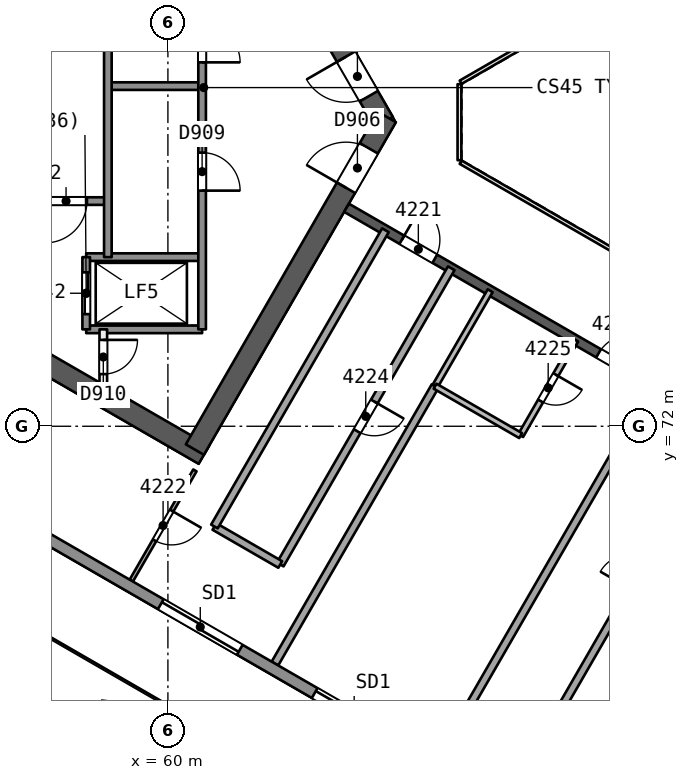
"""IFC4 building model, lengths in metres.
Left out: names, types, materials, properties, quantities, classifications, styles, units other than length and angle.
Written with IfcOpenShell. Run it as: python <this file> out.ifc"""

import sys

from ifc_helpers import new_model, si_unit, direction, frame, frame_2d, origin, place, context, subcontext, project, spatial, rectangle, extrude, element, fill, save


model = new_model("IFC4")
c1 = context("Model", 3, precision=1e-05, world=origin(), true_north=direction((0.0, 1.0)))
c2 = subcontext(c1, "Body", "Model", "MODEL_VIEW")
j1 = project(units=[si_unit("LENGTHUNIT", "METRE"), si_unit("PLANEANGLEUNIT", "RADIAN")], contexts=[c1])
p1 = place(None, origin())
s1 = spatial("IfcSite", under=j1, at=p1, CompositionType="ELEMENT")
p2 = place(p1, origin())
s2 = spatial("IfcBuilding", under=s1, at=p2, CompositionType="ELEMENT")
p3 = place(p2, frame((0.0, 0.0, 174.8)))
s3 = spatial("IfcBuildingStorey", under=s2, at=p3, CompositionType="ELEMENT", Elevation=174.8)
p4 = place(p3, frame((65.682, 80.0, 0.0), z_axis=(0.0, 0.0, 1.0), x_axis=(-0.500000202252, 0.866025287014, 0.0)))
e1 = element("IfcWall", 1, at=p4, inside=s3, PredefinedType="SHEAR", context=c2, shape_type="SweptSolid", body=[
    extrude(rectangle(XDim=10.221, YDim=0.55, at=frame_2d((5.111, 0.0))), origin(), (0.0, 0.0, 1.0), 3.7),
])
p5 = place(p4, frame((0.791, 0.0, 0.0)))
e2 = element("IfcOpeningElement", 2, at=p5, cuts=e1, PredefinedType="OPENING", context=c2, shape_type="SweptSolid", body=[
    extrude(rectangle(XDim=1.2, YDim=2.1, at=frame_2d((0.6, 1.05))), frame((0.0, 0.286, 0.0), z_axis=(0.0, -1.0, 0.0), x_axis=(1.0, 0.0, 0.0)), (0.0, 0.0, 1.0), 0.571),
])
p6 = place(p3, frame((60.709, 88.614, 0.0), z_axis=(0.0, 0.0, 1.0), x_axis=(-0.866020164116, -0.500009075263, 0.0)))
e3 = element("IfcWall", 3, at=p6, inside=s3, PredefinedType="SHEAR", context=c2, shape_type="SweptSolid", body=[
    extrude(rectangle(XDim=14.058, YDim=0.55, at=frame_2d((7.029, 0.0))), origin(), (0.0, 0.0, 1.0), 3.7),
])
p7 = place(p3, frame((48.672, 78.336, 0.0), z_axis=(0.0, 0.0, 1.0), x_axis=(0.866023530946, -0.500003243837, 0.0)))
e4 = element("IfcWall", 4, at=p7, inside=s3, PredefinedType="SHEAR", context=c2, shape_type="SweptSolid", body=[
    extrude(rectangle(XDim=14.175, YDim=0.55, at=frame_2d((7.087, 0.0))), origin(), (0.0, 0.0, 1.0), 3.7),
])
p8 = place(p3, frame((60.709, 71.386, 0.0), z_axis=(0.0, 0.0, 1.0), x_axis=(0.500015938302, 0.866016201606, 0.0)))
e5 = element("IfcWall", 5, at=p8, inside=s3, PredefinedType="SHEAR", context=c2, shape_type="SweptSolid", body=[
    extrude(rectangle(XDim=10.105, YDim=0.55, at=frame_2d((5.053, 0.0))), origin(), (0.0, 0.0, 1.0), 3.7),
])
p9 = place(p8, frame((7.955, 0.0, 0.0)))
e6 = element("IfcOpeningElement", 6, at=p9, cuts=e5, PredefinedType="OPENING", context=c2, shape_type="SweptSolid", body=[
    extrude(rectangle(XDim=1.2, YDim=2.1, at=frame_2d((0.6, 1.05))), frame((0.0, 0.286, 0.0), z_axis=(0.0, -1.0, 0.0), x_axis=(1.0, 0.0, 0.0)), (0.0, 0.0, 1.0), 0.571),
])
p10 = place(p3, frame((64.7, 77.748, 0.0), z_axis=(0.0, 0.0, 1.0), x_axis=(0.866026492143, -0.499998114903, 0.0)))
e7 = element("IfcWall", 7, at=p10, inside=s3, PredefinedType="SHEAR", context=c2, shape_type="SweptSolid", body=[
    extrude(rectangle(XDim=15.588, YDim=0.25, at=frame_2d((7.794, 0.0))), origin(), (0.0, 0.0, 1.0), 3.25),
])
p11 = place(p10, frame((1.682, 0.0, 0.0)))
e8 = element("IfcOpeningElement", 8, at=p11, cuts=e7, PredefinedType="OPENING", context=c2, shape_type="SweptSolid", body=[
    extrude(rectangle(XDim=1.0, YDim=2.1, at=frame_2d((0.5, 1.05))), frame((0.0, 0.135, 0.0), z_axis=(0.0, -1.0, 0.0), x_axis=(1.0, 0.0, 0.0)), (0.0, 0.0, 1.0), 0.271),
])
p12 = place(p10, frame((7.659, 0.0, 0.0)))
e9 = element("IfcOpeningElement", 9, at=p12, cuts=e7, PredefinedType="OPENING", context=c2, shape_type="SweptSolid", body=[
    extrude(rectangle(XDim=1.0, YDim=2.1, at=frame_2d((0.5, 1.05))), frame((0.0, 0.135, 0.0), z_axis=(0.0, -1.0, 0.0), x_axis=(1.0, 0.0, 0.0)), (0.0, 0.0, 1.0), 0.271),
])
p13 = place(p10, frame((11.971, 0.0, 0.0)))
e10 = element("IfcOpeningElement", 10, at=p13, cuts=e7, PredefinedType="OPENING", context=c2, shape_type="SweptSolid", body=[
    extrude(rectangle(XDim=1.0, YDim=2.1, at=frame_2d((0.5, 1.05))), frame((0.0, 0.135, 0.0), z_axis=(0.0, -1.0, 0.0), x_axis=(1.0, 0.0, 0.0)), (0.0, 0.0, 1.0), 0.271),
])
p14 = place(p3, frame((60.71, 70.838, 0.0), z_axis=(0.0, 0.0, 1.0), x_axis=(-0.499981198768, -0.866036258409, 0.0)))
e11 = element("IfcWall", 11, at=p14, inside=s3, PredefinedType="PARTITIONING", context=c2, shape_type="SweptSolid", body=[
    extrude(rectangle(XDim=3.349, YDim=0.1, at=frame_2d((1.674, 0.0))), origin(), (0.0, 0.0, 1.0), 3.25),
])
p15 = place(p14, frame((1.224, 0.0, 0.0)))
e12 = element("IfcOpeningElement", 12, at=p15, cuts=e11, PredefinedType="OPENING", context=c2, shape_type="SweptSolid", body=[
    extrude(rectangle(XDim=0.9, YDim=2.1, at=frame_2d((0.45, 1.05))), frame((0.0, 0.061, 0.0), z_axis=(0.0, -1.0, 0.0), x_axis=(1.0, 0.0, 0.0)), (0.0, 0.0, 1.0), 0.121),
])
p16 = place(p3, frame((67.456, 76.157, 0.0), z_axis=(0.0, 0.0, 1.0), x_axis=(-0.499990139034, -0.866031096941, 0.0)))
e13 = element("IfcWall", 13, at=p16, inside=s3, PredefinedType="PARTITIONING", context=c2, shape_type="SweptSolid", body=[
    extrude(rectangle(XDim=9.0, YDim=0.2, at=frame_2d((4.5, 0.0))), origin(), (0.0, 0.0, 1.0), 3.25),
])
p17 = place(p16, frame((4.05, 0.0, 0.0)))
e14 = element("IfcOpeningElement", 14, at=p17, cuts=e13, PredefinedType="OPENING", context=c2, shape_type="SweptSolid", body=[
    extrude(rectangle(XDim=0.9, YDim=2.1, at=frame_2d((0.45, 1.05))), frame((0.0, 0.11, 0.0), z_axis=(0.0, -1.0, 0.0), x_axis=(1.0, 0.0, 0.0)), (0.0, 0.0, 1.0), 0.221),
])
p18 = place(p3, frame((62.956, 68.363, 0.0), z_axis=(0.0, 0.0, 1.0), x_axis=(-0.866041268327, 0.499972520799, 0.0)))
e15 = element("IfcWall", 15, at=p18, inside=s3, PredefinedType="PARTITIONING", context=c2, shape_type="SweptSolid", body=[
    extrude(rectangle(XDim=2.0, YDim=0.2, at=frame_2d((1.0, 0.0))), origin(), (0.0, 0.0, 1.0), 3.25),
])
p19 = place(p3, frame((61.224, 69.363, 0.0), z_axis=(0.0, 0.0, 1.0), x_axis=(0.499990139034, 0.866031096941, 0.0)))
e16 = element("IfcWall", 16, at=p19, inside=s3, PredefinedType="PARTITIONING", context=c2, shape_type="SweptSolid", body=[
    extrude(rectangle(XDim=9.0, YDim=0.2, at=frame_2d((4.5, 0.0))), origin(), (0.0, 0.0, 1.0), 3.25),
])
p20 = place(p3, frame((62.816, 65.756, 0.0), z_axis=(0.0, 0.0, 1.0), x_axis=(0.500002470373, 0.866023977509, 0.0)))
e17 = element("IfcWall", 17, at=p20, inside=s3, PredefinedType="PARTITIONING", context=c2, shape_type="SweptSolid", body=[
    extrude(rectangle(XDim=8.428, YDim=0.2, at=frame_2d((4.214, 0.0))), origin(), (0.0, 0.0, 1.0), 3.25),
])
p21 = place(p3, frame((67.03, 73.054, 0.0), z_axis=(0.0, 0.0, 1.0), x_axis=(0.499987231761, 0.866032775405, 0.0)))
e18 = element("IfcWall", 18, at=p21, inside=s3, PredefinedType="PARTITIONING", context=c2, shape_type="SweptSolid", body=[
    extrude(rectangle(XDim=2.9, YDim=0.15, at=frame_2d((1.45, 0.0))), origin(), (0.0, 0.0, 1.0), 3.25),
])
p22 = place(p3, frame((70.732, 74.266, 0.0), z_axis=(0.0, 0.0, 1.0), x_axis=(-0.499987231761, -0.866032775405, 0.0)))
e19 = element("IfcWall", 19, at=p22, inside=s3, PredefinedType="PARTITIONING", context=c2, shape_type="SweptSolid", body=[
    extrude(rectangle(XDim=2.9, YDim=0.15, at=frame_2d((1.45, 0.0))), origin(), (0.0, 0.0, 1.0), 3.25),
])
p23 = place(p22, frame((1.05, 0.0, 0.0)))
e20 = element("IfcOpeningElement", 20, at=p23, cuts=e19, PredefinedType="OPENING", context=c2, shape_type="SweptSolid", body=[
    extrude(rectangle(XDim=0.8, YDim=2.1, at=frame_2d((0.4, 1.05))), frame((0.0, 0.085, 0.0), z_axis=(0.0, -1.0, 0.0), x_axis=(1.0, 0.0, 0.0)), (0.0, 0.0, 1.0), 0.171),
])
p24 = place(p3, frame((69.282, 71.754, 0.0), z_axis=(0.0, 0.0, 1.0), x_axis=(-0.866021400173, 0.500006934395, 0.0)))
e21 = element("IfcWall", 21, at=p24, inside=s3, PredefinedType="PARTITIONING", context=c2, shape_type="SweptSolid", body=[
    extrude(rectangle(XDim=2.6, YDim=0.15, at=frame_2d((1.3, 0.0))), origin(), (0.0, 0.0, 1.0), 3.25),
])
p25 = place(p3, frame((67.136, 63.262, 0.0), z_axis=(0.0, 0.0, 1.0), x_axis=(0.499998569178, 0.866026229868, 0.0)))
e22 = element("IfcWall", 22, at=p25, inside=s3, PredefinedType="PARTITIONING", context=c2, shape_type="SweptSolid", body=[
    extrude(rectangle(XDim=11.328, YDim=0.2, at=frame_2d((5.664, 0.0))), origin(), (0.0, 0.0, 1.0), 3.25),
])
p26 = place(p3, frame((70.134, 64.219, 0.0), z_axis=(0.0, 0.0, 1.0), x_axis=(0.5000018851, 0.866024315419, 0.0)))
e23 = element("IfcWall", 23, at=p26, inside=s3, PredefinedType="PARTITIONING", context=c2, shape_type="SweptSolid", body=[
    extrude(rectangle(XDim=9.0, YDim=0.2, at=frame_2d((4.5, 0.0))), origin(), (0.0, 0.0, 1.0), 3.25),
])
p27 = place(p26, frame((4.05, 0.0, 0.0)))
e24 = element("IfcOpeningElement", 24, at=p27, cuts=e23, PredefinedType="OPENING", context=c2, shape_type="SweptSolid", body=[
    extrude(rectangle(XDim=0.9, YDim=2.1, at=frame_2d((0.45, 1.05))), frame((0.0, 0.11, 0.0), z_axis=(0.0, -1.0, 0.0), x_axis=(1.0, 0.0, 0.0)), (0.0, 0.0, 1.0), 0.221),
])
p28 = place(p3, frame((88.844, 50.557, 0.0), z_axis=(0.0, 0.0, 1.0), x_axis=(-0.866025382531, 0.500000036812, 0.0)))
e25 = element("IfcWall", 25, at=p28, inside=s3, PredefinedType="SOLIDWALL", context=c2, shape_type="SweptSolid", body=[
    extrude(rectangle(XDim=53.42, YDim=0.3, at=frame_2d((26.71, 0.0))), origin(), (0.0, 0.0, 1.0), 3.25),
])
p29 = place(p28, frame((31.122, 0.0, 0.0)))
e26 = element("IfcOpeningElement", 26, at=p29, cuts=e25, PredefinedType="OPENING", context=c2, shape_type="SweptSolid", body=[
    extrude(rectangle(XDim=2.4, YDim=2.4, at=frame_2d((1.2, 1.2))), frame((0.0, 0.161, 0.0), z_axis=(0.0, -1.0, 0.0), x_axis=(1.0, 0.0, 0.0)), (0.0, 0.0, 1.0), 0.321),
])
p30 = place(p28, frame((41.52, 0.0, 0.0)))
e27 = element("IfcOpeningElement", 27, at=p30, cuts=e25, PredefinedType="OPENING", context=c2, shape_type="SweptSolid", body=[
    extrude(rectangle(XDim=2.4, YDim=2.4, at=frame_2d((1.2, 1.2))), frame((0.0, 0.161, 0.0), z_axis=(0.0, -1.0, 0.0), x_axis=(1.0, 0.0, 0.0)), (0.0, 0.0, 1.0), 0.321),
])
p31 = place(p28, frame((20.834, 0.0, 0.0)))
e28 = element("IfcOpeningElement", 28, at=p31, cuts=e25, PredefinedType="OPENING", context=c2, shape_type="SweptSolid", body=[
    extrude(rectangle(XDim=2.4, YDim=2.4, at=frame_2d((1.2, 1.2))), frame((0.0, 0.161, 0.0), z_axis=(0.0, -1.0, 0.0), x_axis=(1.0, 0.0, 0.0)), (0.0, 0.0, 1.0), 0.321),
])
p32 = place(p28, frame((9.507, 0.0, 0.0)))
e29 = element("IfcOpeningElement", 29, at=p32, cuts=e25, PredefinedType="OPENING", context=c2, shape_type="SweptSolid", body=[
    extrude(rectangle(XDim=2.4, YDim=2.4, at=frame_2d((1.2, 1.2))), frame((0.0, 0.161, 0.0), z_axis=(0.0, -1.0, 0.0), x_axis=(1.0, 0.0, 0.0)), (0.0, 0.0, 1.0), 0.321),
])
p33 = place(p28, frame((26.446, 0.0, 0.0)))
e30 = element("IfcOpeningElement", 30, at=p33, cuts=e25, PredefinedType="OPENING", context=c2, shape_type="SweptSolid", body=[
    extrude(rectangle(XDim=2.4, YDim=2.4, at=frame_2d((1.2, 1.2))), frame((0.0, 0.161, 0.0), z_axis=(0.0, -1.0, 0.0), x_axis=(1.0, 0.0, 0.0)), (0.0, 0.0, 1.0), 0.321),
])
p34 = place(p3, frame((60.9, 80.95, 0.0), z_axis=(0.0, 0.0, 1.0), x_axis=(-1.0, 0.0, 0.0)))
e31 = element("IfcWall", 31, at=p34, inside=s3, PredefinedType="SOLIDWALL", context=c2, shape_type="SweptSolid", body=[
    extrude(rectangle(XDim=2.48, YDim=0.2, at=frame_2d((1.24, 0.0))), origin(), (0.0, 0.0, 1.0), 3.25),
])
p35 = place(p3, frame((58.42, 77.925, 0.0), z_axis=(0.0, 0.0, 1.0), x_axis=(-1.0, 0.0, 0.0)))
e32 = element("IfcWall", 32, at=p35, inside=s3, PredefinedType="SOLIDWALL", context=c2, shape_type="SweptSolid", body=[
    extrude(rectangle(XDim=7.7, YDim=0.2, at=frame_2d((3.85, 0.0))), origin(), (0.0, 0.0, 1.0), 3.25),
])
p36 = place(p35, frame((0.55, 0.0, 0.0)))
e33 = element("IfcOpeningElement", 33, at=p36, cuts=e32, PredefinedType="OPENING", context=c2, shape_type="SweptSolid", body=[
    extrude(rectangle(XDim=1.1, YDim=2.1, at=frame_2d((0.55, 1.05))), frame((0.0, 0.11, 0.0), z_axis=(0.0, -1.0, 0.0), x_axis=(1.0, 0.0, 0.0)), (0.0, 0.0, 1.0), 0.221),
])
for number, where, z_axis, x_axis in (
    (34, (60.9, 76.45, 0.0), (0.0, 0.0, 1.0), (-1.0, 0.0, 0.0)),
    (35, (60.9, 74.55, 0.0), (0.0, 0.0, 1.0), (-1.0, 0.0, 0.0)),
):
    element("IfcWall", number, at=place(p3, frame(where, z_axis=z_axis, x_axis=x_axis)), inside=s3, PredefinedType="SOLIDWALL", context=c2, shape_type="SweptSolid", body=[
        extrude(rectangle(XDim=3.05, YDim=0.2, at=frame_2d((1.525, 0.0))), origin(), (0.0, 0.0, 1.0), 3.25),
    ])
p37 = place(p3, frame((60.9, 85.45, 0.0), z_axis=(0.0, 0.0, 1.0), x_axis=(0.0, -1.0, 0.0)))
e36 = element("IfcWall", 36, at=p37, inside=s3, PredefinedType="SOLIDWALL", context=c2, shape_type="SweptSolid", body=[
    extrude(rectangle(XDim=10.9, YDim=0.2, at=frame_2d((5.45, 0.0))), origin(), (0.0, 0.0, 1.0), 3.25),
])
p38 = place(p37, frame((0.625, 0.0, 0.0)))
e37 = element("IfcOpeningElement", 37, at=p38, cuts=e36, PredefinedType="OPENING", context=c2, shape_type="SweptSolid", body=[
    extrude(rectangle(XDim=1.0, YDim=2.1, at=frame_2d((0.5, 1.05))), frame((0.0, 0.11, 0.0), z_axis=(0.0, -1.0, 0.0), x_axis=(1.0, 0.0, 0.0)), (0.0, 0.0, 1.0), 0.221),
])
p39 = place(p37, frame((2.875, 0.0, 0.0)))
e38 = element("IfcOpeningElement", 38, at=p39, cuts=e36, PredefinedType="OPENING", context=c2, shape_type="SweptSolid", body=[
    extrude(rectangle(XDim=1.0, YDim=2.1, at=frame_2d((0.5, 1.05))), frame((0.0, 0.11, 0.0), z_axis=(0.0, -1.0, 0.0), x_axis=(1.0, 0.0, 0.0)), (0.0, 0.0, 1.0), 0.221),
])
p40 = place(p37, frame((6.25, 0.0, 0.0)))
e39 = element("IfcOpeningElement", 39, at=p40, cuts=e36, PredefinedType="OPENING", context=c2, shape_type="SweptSolid", body=[
    extrude(rectangle(XDim=1.0, YDim=2.1, at=frame_2d((0.5, 1.05))), frame((0.0, 0.11, 0.0), z_axis=(0.0, -1.0, 0.0), x_axis=(1.0, 0.0, 0.0)), (0.0, 0.0, 1.0), 0.221),
])
p41 = place(p3, frame((58.42, 86.974, 0.0), z_axis=(0.0, 0.0, 1.0), x_axis=(0.0, -1.0, 0.0)))
e40 = element("IfcWall", 40, at=p41, inside=s3, PredefinedType="SOLIDWALL", context=c2, shape_type="SweptSolid", body=[
    extrude(rectangle(XDim=10.524, YDim=0.2, at=frame_2d((5.262, 0.0))), origin(), (0.0, 0.0, 1.0), 3.25),
])
p42 = place(p41, frame((0.312, 0.0, 0.0)))
e41 = element("IfcOpeningElement", 41, at=p42, cuts=e40, PredefinedType="OPENING", context=c2, shape_type="SweptSolid", body=[
    extrude(rectangle(XDim=0.9, YDim=2.1, at=frame_2d((0.45, 1.05))), frame((0.0, 0.11, 0.0), z_axis=(0.0, -1.0, 0.0), x_axis=(1.0, 0.0, 0.0)), (0.0, 0.0, 1.0), 0.221),
])
p43 = place(p3, frame((58.3, 74.55, 0.0), z_axis=(0.0, 0.0, 1.0), x_axis=(0.0, -1.0, 0.0)))
e42 = element("IfcWall", 42, at=p43, inside=s3, PredefinedType="PARTITIONING", context=c2, shape_type="SweptSolid", body=[
    extrude(rectangle(XDim=1.455, YDim=0.2, at=frame_2d((0.728, 0.0))), origin(), (0.0, 0.0, 1.0), 3.25),
])
p44 = place(p43, frame((0.278, 0.0, 0.0)))
e43 = element("IfcOpeningElement", 43, at=p44, cuts=e42, PredefinedType="OPENING", context=c2, shape_type="SweptSolid", body=[
    extrude(rectangle(XDim=0.9, YDim=2.1, at=frame_2d((0.45, 1.05))), frame((0.0, 0.11, 0.0), z_axis=(0.0, -1.0, 0.0), x_axis=(1.0, 0.0, 0.0)), (0.0, 0.0, 1.0), 0.221),
])
p45 = place(p3, frame((57.85, 76.45, 0.0), z_axis=(0.0, 0.0, 1.0), x_axis=(0.0, -1.0, 0.0)))
e44 = element("IfcWall", 44, at=p45, inside=s3, PredefinedType="SOLIDWALL", context=c2, shape_type="SweptSolid", body=[
    extrude(rectangle(XDim=1.9, YDim=0.2, at=frame_2d((0.95, 0.0))), origin(), (0.0, 0.0, 1.0), 3.25),
])
p46 = place(p45, frame((0.4, 0.0, 0.0)))
e45 = element("IfcOpeningElement", 45, at=p46, cuts=e44, PredefinedType="OPENING", context=c2, shape_type="SweptSolid", body=[
    extrude(rectangle(XDim=1.1, YDim=2.1, at=frame_2d((0.55, 1.05))), frame((0.0, 0.11, 0.0), z_axis=(0.0, -1.0, 0.0), x_axis=(1.0, 0.0, 0.0)), (0.0, 0.0, 1.0), 0.221),
])
p47 = place(p3, frame((77.738, 86.846, 0.0), z_axis=(0.0, 0.0, 1.0), x_axis=(-0.866026658274, -0.499997827154, 0.0)))
e46 = element("IfcWall", 46, at=p47, inside=s3, PredefinedType="PARTITIONING", context=c2, shape_type="SweptSolid", body=[
    extrude(rectangle(XDim=11.588, YDim=0.1, at=frame_2d((5.794, 0.0))), origin(), (0.0, 0.0, 1.0), 3.25),
])
p48 = place(p3, frame((67.672, 81.0, 0.0), z_axis=(0.0, 0.0, 1.0), x_axis=(0.0, -1.0, 0.0)))
e47 = element("IfcWall", 47, at=p48, inside=s3, PredefinedType="PARTITIONING", context=c2, shape_type="SweptSolid", body=[
    extrude(rectangle(XDim=2.0, YDim=0.1, at=frame_2d((1.0, 0.0))), origin(), (0.0, 0.0, 1.0), 3.25),
])
p49 = place(p3, frame((67.702, 78.948, 0.0), z_axis=(0.0, 0.0, 1.0), x_axis=(0.866026658274, -0.499997827154, 0.0)))
e48 = element("IfcWall", 48, at=p49, inside=s3, PredefinedType="PARTITIONING", context=c2, shape_type="SweptSolid", body=[
    extrude(rectangle(XDim=11.588, YDim=0.1, at=frame_2d((5.794, 0.0))), origin(), (0.0, 0.0, 1.0), 3.25),
])
p50 = place(p11, origin())
e49 = element("IfcDoor", 49, at=p50, inside=s3, OperationType="SINGLE_SWING_LEFT", PredefinedType="NOTDEFINED", context=c2, shape_type="SweptSolid", body=[
    extrude(rectangle(XDim=1.0, YDim=2.1, at=frame_2d((0.5, 1.05))), frame((0.0, 0.025, 0.0), z_axis=(0.0, -1.0, 0.0), x_axis=(1.0, 0.0, 0.0)), (0.0, 0.0, 1.0), 0.05),
])
fill(e8, e49)
p51 = place(p15, origin())
e50 = element("IfcDoor", 50, at=p51, inside=s3, OperationType="SINGLE_SWING_LEFT", PredefinedType="NOTDEFINED", context=c2, shape_type="SweptSolid", body=[
    extrude(rectangle(XDim=0.9, YDim=2.1, at=frame_2d((0.45, 1.05))), frame((0.0, 0.025, 0.0), z_axis=(0.0, -1.0, 0.0), x_axis=(1.0, 0.0, 0.0)), (0.0, 0.0, 1.0), 0.05),
])
fill(e12, e50)
p52 = place(p17, origin())
e51 = element("IfcDoor", 51, at=p52, inside=s3, OperationType="SINGLE_SWING_LEFT", PredefinedType="NOTDEFINED", context=c2, shape_type="SweptSolid", body=[
    extrude(rectangle(XDim=0.9, YDim=2.1, at=frame_2d((0.45, 1.05))), frame((0.0, 0.025, 0.0), z_axis=(0.0, -1.0, 0.0), x_axis=(1.0, 0.0, 0.0)), (0.0, 0.0, 1.0), 0.05),
])
fill(e14, e51)
p53 = place(p23, origin())
e52 = element("IfcDoor", 52, at=p53, inside=s3, OperationType="SINGLE_SWING_LEFT", PredefinedType="NOTDEFINED", context=c2, shape_type="SweptSolid", body=[
    extrude(rectangle(XDim=0.8, YDim=2.1, at=frame_2d((0.4, 1.05))), frame((0.0, 0.025, 0.0), z_axis=(0.0, -1.0, 0.0), x_axis=(1.0, 0.0, 0.0)), (0.0, 0.0, 1.0), 0.05),
])
fill(e20, e52)
p54 = place(p12, origin())
e53 = element("IfcDoor", 53, at=p54, inside=s3, OperationType="SINGLE_SWING_RIGHT", PredefinedType="NOTDEFINED", context=c2, shape_type="SweptSolid", body=[
    extrude(rectangle(XDim=1.0, YDim=2.1, at=frame_2d((0.5, 1.05))), frame((0.0, 0.025, 0.0), z_axis=(0.0, -1.0, 0.0), x_axis=(1.0, 0.0, 0.0)), (0.0, 0.0, 1.0), 0.05),
])
fill(e9, e53)
p55 = place(p29, origin())
e54 = element("IfcDoor", 54, at=p55, inside=s3, OperationType="SLIDING_TO_LEFT", PredefinedType="NOTDEFINED", context=c2, shape_type="SweptSolid", body=[
    extrude(rectangle(XDim=2.4, YDim=2.4, at=frame_2d((1.2, 1.2))), frame((0.0, 0.025, 0.0), z_axis=(0.0, -1.0, 0.0), x_axis=(1.0, 0.0, 0.0)), (0.0, 0.0, 1.0), 0.05),
])
fill(e26, e54)
p56 = place(p33, origin())
e55 = element("IfcDoor", 55, at=p56, inside=s3, OperationType="SLIDING_TO_LEFT", PredefinedType="NOTDEFINED", context=c2, shape_type="SweptSolid", body=[
    extrude(rectangle(XDim=2.4, YDim=2.4, at=frame_2d((1.2, 1.2))), frame((0.0, 0.025, 0.0), z_axis=(0.0, -1.0, 0.0), x_axis=(1.0, 0.0, 0.0)), (0.0, 0.0, 1.0), 0.05),
])
fill(e30, e55)
p57 = place(p5, origin())
e56 = element("IfcDoor", 56, at=p57, inside=s3, OperationType="SINGLE_SWING_RIGHT", PredefinedType="NOTDEFINED", context=c2, shape_type="SweptSolid", body=[
    extrude(rectangle(XDim=1.2, YDim=2.1, at=frame_2d((0.6, 1.05))), frame((0.0, 0.025, 0.0), z_axis=(0.0, -1.0, 0.0), x_axis=(1.0, 0.0, 0.0)), (0.0, 0.0, 1.0), 0.05),
])
fill(e2, e56)
p58 = place(p9, origin())
e57 = element("IfcDoor", 57, at=p58, inside=s3, OperationType="SINGLE_SWING_LEFT", PredefinedType="NOTDEFINED", context=c2, shape_type="SweptSolid", body=[
    extrude(rectangle(XDim=1.2, YDim=2.1, at=frame_2d((0.6, 1.05))), frame((0.0, 0.025, 0.0), z_axis=(0.0, -1.0, 0.0), x_axis=(1.0, 0.0, 0.0)), (0.0, 0.0, 1.0), 0.05),
])
fill(e6, e57)
p59 = place(p46, origin())
e58 = element("IfcDoor", 58, at=p59, inside=s3, OperationType="SLIDING_TO_RIGHT", PredefinedType="NOTDEFINED", context=c2, shape_type="SweptSolid", body=[
    extrude(rectangle(XDim=1.1, YDim=2.1, at=frame_2d((0.55, 1.05))), frame((0.0, 0.025, 0.0), z_axis=(0.0, -1.0, 0.0), x_axis=(1.0, 0.0, 0.0)), (0.0, 0.0, 1.0), 0.05),
])
fill(e45, e58)
p60 = place(p39, origin())
e59 = element("IfcDoor", 59, at=p60, inside=s3, OperationType="SINGLE_SWING_RIGHT", PredefinedType="NOTDEFINED", context=c2, shape_type="SweptSolid", body=[
    extrude(rectangle(XDim=1.0, YDim=2.1, at=frame_2d((0.5, 1.05))), frame((0.0, 0.025, 0.0), z_axis=(0.0, -1.0, 0.0), x_axis=(1.0, 0.0, 0.0)), (0.0, 0.0, 1.0), 0.05),
])
fill(e38, e59)
p61 = place(p40, origin())
e60 = element("IfcDoor", 60, at=p61, inside=s3, OperationType="SINGLE_SWING_RIGHT", PredefinedType="NOTDEFINED", context=c2, shape_type="SweptSolid", body=[
    extrude(rectangle(XDim=1.0, YDim=2.1, at=frame_2d((0.5, 1.05))), frame((0.0, 0.025, 0.0), z_axis=(0.0, -1.0, 0.0), x_axis=(1.0, 0.0, 0.0)), (0.0, 0.0, 1.0), 0.05),
])
fill(e39, e60)
p62 = place(p44, origin())
e61 = element("IfcDoor", 61, at=p62, inside=s3, OperationType="SINGLE_SWING_LEFT", PredefinedType="NOTDEFINED", context=c2, shape_type="SweptSolid", body=[
    extrude(rectangle(XDim=0.9, YDim=2.1, at=frame_2d((0.45, 1.05))), frame((0.0, 0.025, 0.0), z_axis=(0.0, -1.0, 0.0), x_axis=(1.0, 0.0, 0.0)), (0.0, 0.0, 1.0), 0.05),
])
fill(e43, e61)
p63 = place(p36, origin())
e62 = element("IfcDoor", 62, at=p63, inside=s3, OperationType="SINGLE_SWING_RIGHT", PredefinedType="NOTDEFINED", context=c2, shape_type="SweptSolid", body=[
    extrude(rectangle(XDim=1.1, YDim=2.1, at=frame_2d((0.55, 1.05))), frame((0.0, 0.025, 0.0), z_axis=(0.0, -1.0, 0.0), x_axis=(1.0, 0.0, 0.0)), (0.0, 0.0, 1.0), 0.05),
])
fill(e33, e62)
save(model, sys.argv[1])
